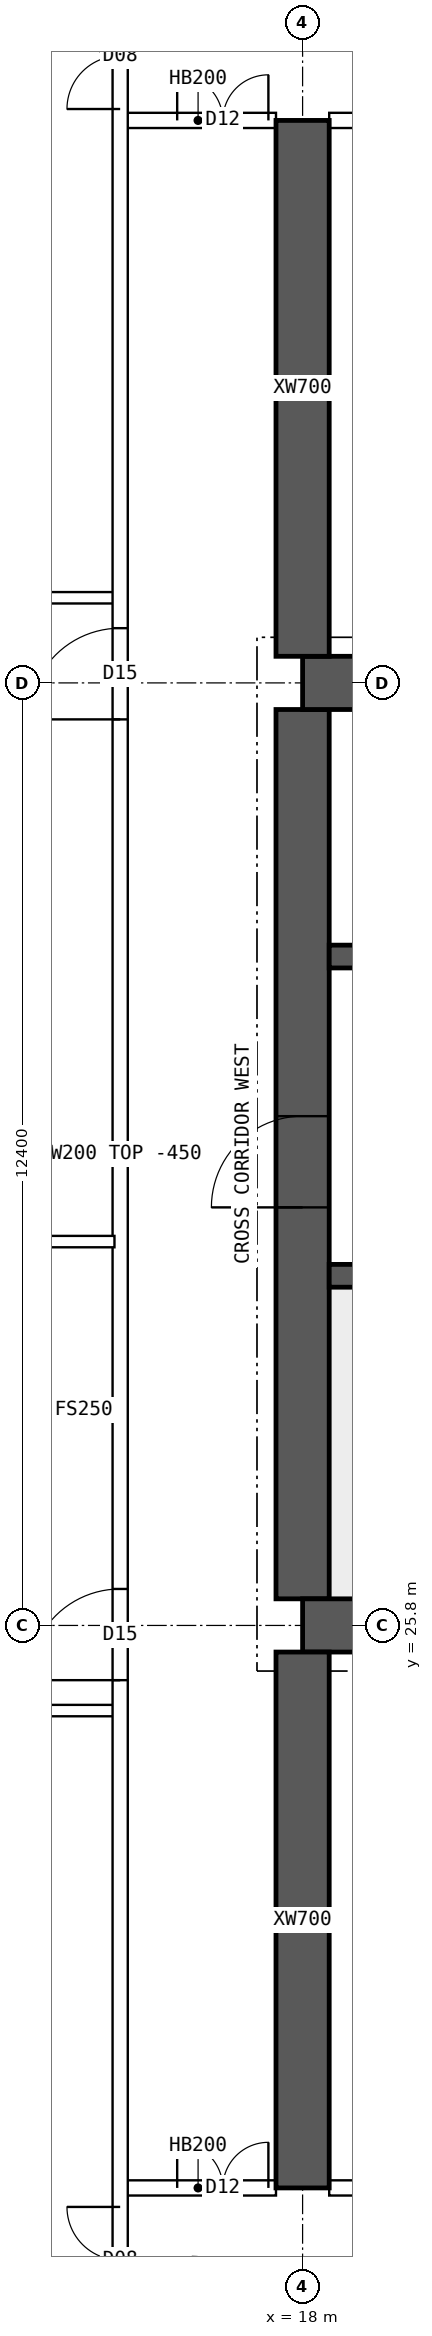
"""IFC4 building model, lengths in metres.
Left out: names, types, materials, properties, quantities, classifications, styles, units other than length and angle.
Written with IfcOpenShell. Run it as: python <this file> out.ifc"""

import sys

from ifc_helpers import new_model, si_unit, direction, frame, frame_2d, origin, place, context, subcontext, project, spatial, polyline, rectangle, outline, extrude, element, fill, save


model = new_model("IFC4")
c1 = context("Model", 3, precision=1e-05, world=origin(), true_north=direction((0.0, 1.0)))
c2 = subcontext(c1, "Body", "Model", "MODEL_VIEW")
j1 = project(units=[si_unit("LENGTHUNIT", "METRE"), si_unit("PLANEANGLEUNIT", "RADIAN")], contexts=[c1])
p1 = place(None, origin())
s1 = spatial("IfcSite", under=j1, at=p1, CompositionType="ELEMENT")
p2 = place(p1, origin())
s2 = spatial("IfcBuilding", under=s1, at=p2, CompositionType="ELEMENT")
p3 = place(p2, frame((0.0, 0.0, 227.8)))
s3 = spatial("IfcBuildingStorey", under=s2, at=p3, CompositionType="ELEMENT", Elevation=227.8)
for number, where, z_axis, x_axis in (
    (1, (18.0, 25.8, 0.0), (0.0, 0.0, 1.0), (1.0, 0.0, 0.0)),
    (2, (18.0, 38.2, 0.0), (0.0, 0.0, 1.0), (1.0, 0.0, 0.0)),
):
    element("IfcWall", number, at=place(p3, frame(where, z_axis=z_axis, x_axis=x_axis)), inside=s3, PredefinedType="SHEAR", context=c2, shape_type="SweptSolid", body=[
        extrude(rectangle(XDim=48.0, YDim=0.7, at=frame_2d((24.0, 0.0))), origin(), (0.0, 0.0, 1.0), 3.75),
    ])
p4 = place(p3, frame((18.0, 26.15, 0.0), z_axis=(0.0, 0.0, 1.0), x_axis=(0.0, 1.0, 0.0)))
e3 = element("IfcWall", 3, at=p4, inside=s3, PredefinedType="SHEAR", context=c2, shape_type="SweptSolid", body=[
    extrude(rectangle(XDim=11.7, YDim=0.7, at=frame_2d((5.85, 0.0))), origin(), (0.0, 0.0, 1.0), 3.75),
])
p5 = place(p4, frame((5.15, 0.0, 0.0)))
e4 = element("IfcOpeningElement", 4, at=p5, cuts=e3, PredefinedType="OPENING", context=c2, shape_type="SweptSolid", body=[
    extrude(rectangle(XDim=1.2, YDim=2.1, at=frame_2d((0.6, 1.05))), frame((0.0, 0.36, 0.0), z_axis=(0.0, -1.0, 0.0), x_axis=(1.0, 0.0, 0.0)), (0.0, 0.0, 1.0), 0.72),
])
p6 = place(p3, frame((18.35, 30.4, 0.0), z_axis=(0.0, 0.0, 1.0), x_axis=(1.0, 0.0, 0.0)))
e5 = element("IfcWall", 5, at=p6, inside=s3, PredefinedType="SHEAR", context=c2, shape_type="SweptSolid", body=[
    extrude(rectangle(XDim=47.3, YDim=0.3, at=frame_2d((23.65, 0.0))), origin(), (0.0, 0.0, 1.0), 3.75),
])
p7 = place(p6, frame((0.4, 0.0, 0.0)))
e6 = element("IfcOpeningElement", 6, at=p7, cuts=e5, PredefinedType="OPENING", context=c2, shape_type="SweptSolid", body=[
    extrude(rectangle(XDim=1.0, YDim=2.1, at=frame_2d((0.5, 1.05))), frame((0.0, 0.16, 0.0), z_axis=(0.0, -1.0, 0.0), x_axis=(1.0, 0.0, 0.0)), (0.0, 0.0, 1.0), 0.32),
])
p8 = place(p6, frame((45.9, 0.0, 0.0)))
e7 = element("IfcOpeningElement", 7, at=p8, cuts=e5, PredefinedType="OPENING", context=c2, shape_type="SweptSolid", body=[
    extrude(rectangle(XDim=1.0, YDim=2.1, at=frame_2d((0.5, 1.05))), frame((0.0, 0.16, 0.0), z_axis=(0.0, -1.0, 0.0), x_axis=(1.0, 0.0, 0.0)), (0.0, 0.0, 1.0), 0.32),
])
p9 = place(p6, frame((8.4, 0.0, 0.0)))
e8 = element("IfcOpeningElement", 8, at=p9, cuts=e5, PredefinedType="OPENING", context=c2, shape_type="SweptSolid", body=[
    extrude(rectangle(XDim=1.1, YDim=2.1, at=frame_2d((0.55, 1.05))), frame((0.0, 0.16, 0.0), z_axis=(0.0, -1.0, 0.0), x_axis=(1.0, 0.0, 0.0)), (0.0, 0.0, 1.0), 0.32),
])
p10 = place(p6, frame((11.0, 0.0, 0.0)))
e9 = element("IfcOpeningElement", 9, at=p10, cuts=e5, PredefinedType="OPENING", context=c2, shape_type="SweptSolid", body=[
    extrude(rectangle(XDim=1.1, YDim=2.1, at=frame_2d((0.55, 1.05))), frame((0.0, 0.16, 0.0), z_axis=(0.0, -1.0, 0.0), x_axis=(1.0, 0.0, 0.0)), (0.0, 0.0, 1.0), 0.32),
])
p11 = place(p6, frame((13.6, 0.0, 0.0)))
e10 = element("IfcOpeningElement", 10, at=p11, cuts=e5, PredefinedType="OPENING", context=c2, shape_type="SweptSolid", body=[
    extrude(rectangle(XDim=1.1, YDim=2.1, at=frame_2d((0.55, 1.05))), frame((0.0, 0.16, 0.0), z_axis=(0.0, -1.0, 0.0), x_axis=(1.0, 0.0, 0.0)), (0.0, 0.0, 1.0), 0.32),
])
p12 = place(p6, frame((16.2, 0.0, 0.0)))
e11 = element("IfcOpeningElement", 11, at=p12, cuts=e5, PredefinedType="OPENING", context=c2, shape_type="SweptSolid", body=[
    extrude(rectangle(XDim=1.1, YDim=2.1, at=frame_2d((0.55, 1.05))), frame((0.0, 0.16, 0.0), z_axis=(0.0, -1.0, 0.0), x_axis=(1.0, 0.0, 0.0)), (0.0, 0.0, 1.0), 0.32),
])
p13 = place(p6, frame((18.975, 0.0, 0.0)))
e12 = element("IfcOpeningElement", 12, at=p13, cuts=e5, PredefinedType="OPENING", context=c2, shape_type="SweptSolid", body=[
    extrude(rectangle(XDim=0.9, YDim=2.1, at=frame_2d((0.45, 1.05))), frame((0.0, 0.16, 0.0), z_axis=(0.0, -1.0, 0.0), x_axis=(1.0, 0.0, 0.0)), (0.0, 0.0, 1.0), 0.32),
])
p14 = place(p6, frame((24.475, 0.0, 0.0)))
e13 = element("IfcOpeningElement", 13, at=p14, cuts=e5, PredefinedType="OPENING", context=c2, shape_type="SweptSolid", body=[
    extrude(rectangle(XDim=0.9, YDim=2.1, at=frame_2d((0.45, 1.05))), frame((0.0, 0.16, 0.0), z_axis=(0.0, -1.0, 0.0), x_axis=(1.0, 0.0, 0.0)), (0.0, 0.0, 1.0), 0.32),
])
p15 = place(p6, frame((30.267, 0.0, 0.0)))
e14 = element("IfcOpeningElement", 14, at=p15, cuts=e5, PredefinedType="OPENING", context=c2, shape_type="SweptSolid", body=[
    extrude(rectangle(XDim=1.1, YDim=2.1, at=frame_2d((0.55, 1.05))), frame((0.0, 0.16, 0.0), z_axis=(0.0, -1.0, 0.0), x_axis=(1.0, 0.0, 0.0)), (0.0, 0.0, 1.0), 0.32),
])
p16 = place(p6, frame((33.8, 0.0, 0.0)))
e15 = element("IfcOpeningElement", 15, at=p16, cuts=e5, PredefinedType="OPENING", context=c2, shape_type="SweptSolid", body=[
    extrude(rectangle(XDim=1.1, YDim=2.1, at=frame_2d((0.55, 1.05))), frame((0.0, 0.16, 0.0), z_axis=(0.0, -1.0, 0.0), x_axis=(1.0, 0.0, 0.0)), (0.0, 0.0, 1.0), 0.32),
])
p17 = place(p6, frame((37.333, 0.0, 0.0)))
e16 = element("IfcOpeningElement", 16, at=p17, cuts=e5, PredefinedType="OPENING", context=c2, shape_type="SweptSolid", body=[
    extrude(rectangle(XDim=1.1, YDim=2.1, at=frame_2d((0.55, 1.05))), frame((0.0, 0.16, 0.0), z_axis=(0.0, -1.0, 0.0), x_axis=(1.0, 0.0, 0.0)), (0.0, 0.0, 1.0), 0.32),
])
p18 = place(p3, frame((18.35, 34.6, 0.0), z_axis=(0.0, 0.0, 1.0), x_axis=(1.0, 0.0, 0.0)))
e17 = element("IfcWall", 17, at=p18, inside=s3, PredefinedType="SHEAR", context=c2, shape_type="SweptSolid", body=[
    extrude(rectangle(XDim=47.3, YDim=0.3, at=frame_2d((23.65, 0.0))), origin(), (0.0, 0.0, 1.0), 3.75),
])
p19 = place(p18, frame((0.9, 0.0, 0.0)))
e18 = element("IfcOpeningElement", 18, at=p19, cuts=e17, PredefinedType="OPENING", context=c2, shape_type="SweptSolid", body=[
    extrude(rectangle(XDim=1.1, YDim=2.1, at=frame_2d((0.55, 1.05))), frame((0.0, 0.16, 0.0), z_axis=(0.0, -1.0, 0.0), x_axis=(1.0, 0.0, 0.0)), (0.0, 0.0, 1.0), 0.32),
])
p20 = place(p18, frame((45.3, 0.0, 0.0)))
e19 = element("IfcOpeningElement", 19, at=p20, cuts=e17, PredefinedType="OPENING", context=c2, shape_type="SweptSolid", body=[
    extrude(rectangle(XDim=1.1, YDim=2.1, at=frame_2d((0.55, 1.05))), frame((0.0, 0.16, 0.0), z_axis=(0.0, -1.0, 0.0), x_axis=(1.0, 0.0, 0.0)), (0.0, 0.0, 1.0), 0.32),
])
p21 = place(p18, frame((4.25, 0.0, 0.0)))
e20 = element("IfcOpeningElement", 20, at=p21, cuts=e17, PredefinedType="OPENING", context=c2, shape_type="SweptSolid", body=[
    extrude(rectangle(XDim=0.9, YDim=2.1, at=frame_2d((0.45, 1.05))), frame((0.0, 0.16, 0.0), z_axis=(0.0, -1.0, 0.0), x_axis=(1.0, 0.0, 0.0)), (0.0, 0.0, 1.0), 0.32),
])
p22 = place(p18, frame((42.15, 0.0, 0.0)))
e21 = element("IfcOpeningElement", 21, at=p22, cuts=e17, PredefinedType="OPENING", context=c2, shape_type="SweptSolid", body=[
    extrude(rectangle(XDim=0.9, YDim=2.1, at=frame_2d((0.45, 1.05))), frame((0.0, 0.16, 0.0), z_axis=(0.0, -1.0, 0.0), x_axis=(1.0, 0.0, 0.0)), (0.0, 0.0, 1.0), 0.32),
])
p23 = place(p18, frame((9.025, 0.0, 0.0)))
e22 = element("IfcOpeningElement", 22, at=p23, cuts=e17, PredefinedType="OPENING", context=c2, shape_type="SweptSolid", body=[
    extrude(rectangle(XDim=0.9, YDim=2.1, at=frame_2d((0.45, 1.05))), frame((0.0, 0.16, 0.0), z_axis=(0.0, -1.0, 0.0), x_axis=(1.0, 0.0, 0.0)), (0.0, 0.0, 1.0), 0.32),
])
p24 = place(p18, frame((12.999, 0.0, 0.0)))
e23 = element("IfcOpeningElement", 23, at=p24, cuts=e17, PredefinedType="OPENING", context=c2, shape_type="SweptSolid", body=[
    extrude(rectangle(XDim=0.9, YDim=2.1, at=frame_2d((0.45, 1.05))), frame((0.0, 0.16, 0.0), z_axis=(0.0, -1.0, 0.0), x_axis=(1.0, 0.0, 0.0)), (0.0, 0.0, 1.0), 0.32),
])
p25 = place(p18, frame((16.646, 0.0, 0.0)))
e24 = element("IfcOpeningElement", 24, at=p25, cuts=e17, PredefinedType="OPENING", context=c2, shape_type="SweptSolid", body=[
    extrude(rectangle(XDim=0.9, YDim=2.1, at=frame_2d((0.45, 1.05))), frame((0.0, 0.16, 0.0), z_axis=(0.0, -1.0, 0.0), x_axis=(1.0, 0.0, 0.0)), (0.0, 0.0, 1.0), 0.32),
])
p26 = place(p18, frame((20.405, 0.0, 0.0)))
e25 = element("IfcOpeningElement", 25, at=p26, cuts=e17, PredefinedType="OPENING", context=c2, shape_type="SweptSolid", body=[
    extrude(rectangle(XDim=0.9, YDim=2.1, at=frame_2d((0.45, 1.05))), frame((0.0, 0.16, 0.0), z_axis=(0.0, -1.0, 0.0), x_axis=(1.0, 0.0, 0.0)), (0.0, 0.0, 1.0), 0.32),
])
p27 = place(p18, frame((24.811, 0.0, 0.0)))
e26 = element("IfcOpeningElement", 26, at=p27, cuts=e17, PredefinedType="OPENING", context=c2, shape_type="SweptSolid", body=[
    extrude(rectangle(XDim=0.9, YDim=2.1, at=frame_2d((0.45, 1.05))), frame((0.0, 0.16, 0.0), z_axis=(0.0, -1.0, 0.0), x_axis=(1.0, 0.0, 0.0)), (0.0, 0.0, 1.0), 0.32),
])
p28 = place(p18, frame((27.608, 0.0, 0.0)))
e27 = element("IfcOpeningElement", 27, at=p28, cuts=e17, PredefinedType="OPENING", context=c2, shape_type="SweptSolid", body=[
    extrude(rectangle(XDim=0.9, YDim=2.1, at=frame_2d((0.45, 1.05))), frame((0.0, 0.16, 0.0), z_axis=(0.0, -1.0, 0.0), x_axis=(1.0, 0.0, 0.0)), (0.0, 0.0, 1.0), 0.32),
])
p29 = place(p18, frame((33.729, 0.0, 0.0)))
e28 = element("IfcOpeningElement", 28, at=p29, cuts=e17, PredefinedType="OPENING", context=c2, shape_type="SweptSolid", body=[
    extrude(rectangle(XDim=0.9, YDim=2.1, at=frame_2d((0.45, 1.05))), frame((0.0, 0.16, 0.0), z_axis=(0.0, -1.0, 0.0), x_axis=(1.0, 0.0, 0.0)), (0.0, 0.0, 1.0), 0.32),
])
for number, where, z_axis, x_axis in (
    (29, (18.0, 18.4, 0.0), (0.0, 0.0, 1.0), (0.0, 1.0, 0.0)),
    (30, (18.0, 38.55, 0.0), (0.0, 0.0, 1.0), (0.0, 1.0, 0.0)),
):
    element("IfcWall", number, at=place(p3, frame(where, z_axis=z_axis, x_axis=x_axis)), inside=s3, PredefinedType="SHEAR", context=c2, shape_type="SweptSolid", body=[
        extrude(rectangle(XDim=7.05, YDim=0.7, at=frame_2d((3.525, 0.0))), origin(), (0.0, 0.0, 1.0), 3.75),
    ])
p30 = place(p3, frame((15.6, 18.4, 0.0), z_axis=(0.0, 0.0, 1.0), x_axis=(1.0, 0.0, 0.0)))
e31 = element("IfcWall", 31, at=p30, inside=s3, PredefinedType="SOLIDWALL", context=c2, shape_type="SweptSolid", body=[
    extrude(rectangle(XDim=2.05, YDim=0.2, at=frame_2d((1.025, 0.0))), origin(), (0.0, 0.0, 1.0), 3.3),
])
p31 = place(p30, frame((0.75, 0.0, 0.0)))
e32 = element("IfcOpeningElement", 32, at=p31, cuts=e31, PredefinedType="OPENING", context=c2, shape_type="SweptSolid", body=[
    extrude(rectangle(XDim=1.2, YDim=2.1, at=frame_2d((0.6, 1.05))), frame((0.0, 0.11, 0.0), z_axis=(0.0, -1.0, 0.0), x_axis=(1.0, 0.0, 0.0)), (0.0, 0.0, 1.0), 0.22),
])
p32 = place(p3, frame((18.35, 18.4, 0.0), z_axis=(0.0, 0.0, 1.0), x_axis=(1.0, 0.0, 0.0)))
e33 = element("IfcWall", 33, at=p32, inside=s3, PredefinedType="SOLIDWALL", context=c2, shape_type="SweptSolid", body=[
    extrude(rectangle(XDim=5.3, YDim=0.2, at=frame_2d((2.65, 0.0))), origin(), (0.0, 0.0, 1.0), 3.3),
])
p33 = place(p32, frame((0.35, 0.0, 0.0)))
e34 = element("IfcOpeningElement", 34, at=p33, cuts=e33, PredefinedType="OPENING", context=c2, shape_type="SweptSolid", body=[
    extrude(rectangle(XDim=0.9, YDim=2.1, at=frame_2d((0.45, 1.05))), frame((0.0, 0.11, 0.0), z_axis=(0.0, -1.0, 0.0), x_axis=(1.0, 0.0, 0.0)), (0.0, 0.0, 1.0), 0.22),
])
p34 = place(p32, frame((3.2, 0.0, 0.0)))
e35 = element("IfcOpeningElement", 35, at=p34, cuts=e33, PredefinedType="OPENING", context=c2, shape_type="SweptSolid", body=[
    extrude(rectangle(XDim=0.9, YDim=2.1, at=frame_2d((0.45, 1.05))), frame((0.0, 0.11, 0.0), z_axis=(0.0, -1.0, 0.0), x_axis=(1.0, 0.0, 0.0)), (0.0, 0.0, 1.0), 0.22),
])
p35 = place(p3, frame((15.6, 45.6, 0.0), z_axis=(0.0, 0.0, 1.0), x_axis=(1.0, 0.0, 0.0)))
e36 = element("IfcWall", 36, at=p35, inside=s3, PredefinedType="SOLIDWALL", context=c2, shape_type="SweptSolid", body=[
    extrude(rectangle(XDim=2.05, YDim=0.2, at=frame_2d((1.025, 0.0))), origin(), (0.0, 0.0, 1.0), 3.3),
])
p36 = place(p35, frame((0.75, 0.0, 0.0)))
e37 = element("IfcOpeningElement", 37, at=p36, cuts=e36, PredefinedType="OPENING", context=c2, shape_type="SweptSolid", body=[
    extrude(rectangle(XDim=1.2, YDim=2.1, at=frame_2d((0.6, 1.05))), frame((0.0, 0.11, 0.0), z_axis=(0.0, -1.0, 0.0), x_axis=(1.0, 0.0, 0.0)), (0.0, 0.0, 1.0), 0.22),
])
p37 = place(p3, frame((18.35, 45.6, 0.0), z_axis=(0.0, 0.0, 1.0), x_axis=(1.0, 0.0, 0.0)))
e38 = element("IfcWall", 38, at=p37, inside=s3, PredefinedType="SOLIDWALL", context=c2, shape_type="SweptSolid", body=[
    extrude(rectangle(XDim=5.3, YDim=0.2, at=frame_2d((2.65, 0.0))), origin(), (0.0, 0.0, 1.0), 3.3),
])
p38 = place(p37, frame((0.8, 0.0, 0.0)))
e39 = element("IfcOpeningElement", 39, at=p38, cuts=e38, PredefinedType="OPENING", context=c2, shape_type="SweptSolid", body=[
    extrude(rectangle(XDim=1.0, YDim=2.1, at=frame_2d((0.5, 1.05))), frame((0.0, 0.11, 0.0), z_axis=(0.0, -1.0, 0.0), x_axis=(1.0, 0.0, 0.0)), (0.0, 0.0, 1.0), 0.22),
])
p39 = place(p3, frame((8.705, 30.85, 0.0), z_axis=(0.0, 0.0, 1.0), x_axis=(1.0, 0.0, 0.0)))
e40 = element("IfcWall", 40, at=p39, inside=s3, PredefinedType="PARTITIONING", context=c2, shape_type="SweptSolid", body=[
    extrude(outline(polyline([(0.0, 0.0), (6.82, 0.0), (6.82, 3.3), (3.597, 3.3), (3.595, 2.85), (2.997, 2.85), (2.995, 3.3), (0.0, 3.3), (0.0, 0.0)])), frame((0.0, 0.075, 0.0), z_axis=(0.0, -1.0, 0.0), x_axis=(1.0, 0.0, 0.0)), (0.0, 0.0, 1.0), 0.15),
])
p40 = place(p3, frame((15.6, 11.646, 0.0), z_axis=(0.0, 0.0, 1.0), x_axis=(0.0, 1.0, 0.0)))
e41 = element("IfcWall", 41, at=p40, inside=s3, PredefinedType="SOLIDWALL", context=c2, shape_type="SweptSolid", body=[
    extrude(rectangle(XDim=40.708, YDim=0.2, at=frame_2d((20.354, 0.0))), origin(), (0.0, 0.0, 1.0), 3.3),
])
p41 = place(p40, frame((13.434, 0.0, 0.0)))
e42 = element("IfcOpeningElement", 42, at=p41, cuts=e41, PredefinedType="OPENING", context=c2, shape_type="SweptSolid", body=[
    extrude(rectangle(XDim=1.2, YDim=2.1, at=frame_2d((0.6, 1.05))), frame((0.0, 0.11, 0.0), z_axis=(0.0, -1.0, 0.0), x_axis=(1.0, 0.0, 0.0)), (0.0, 0.0, 1.0), 0.22),
])
p42 = place(p40, frame((26.074, 0.0, 0.0)))
e43 = element("IfcOpeningElement", 43, at=p42, cuts=e41, PredefinedType="OPENING", context=c2, shape_type="SweptSolid", body=[
    extrude(rectangle(XDim=1.2, YDim=2.1, at=frame_2d((0.6, 1.05))), frame((0.0, 0.11, 0.0), z_axis=(0.0, -1.0, 0.0), x_axis=(1.0, 0.0, 0.0)), (0.0, 0.0, 1.0), 0.22),
])
p43 = place(p40, frame((5.104, 0.0, 0.0)))
e44 = element("IfcOpeningElement", 44, at=p43, cuts=e41, PredefinedType="OPENING", context=c2, shape_type="SweptSolid", body=[
    extrude(rectangle(XDim=1.4, YDim=2.1, at=frame_2d((0.7, 1.05))), frame((0.0, 0.11, 0.0), z_axis=(0.0, -1.0, 0.0), x_axis=(1.0, 0.0, 0.0)), (0.0, 0.0, 1.0), 0.22),
])
p44 = place(p40, frame((34.104, 0.0, 0.0)))
e45 = element("IfcOpeningElement", 45, at=p44, cuts=e41, PredefinedType="OPENING", context=c2, shape_type="SweptSolid", body=[
    extrude(rectangle(XDim=1.4, YDim=2.1, at=frame_2d((0.7, 1.05))), frame((0.0, 0.11, 0.0), z_axis=(0.0, -1.0, 0.0), x_axis=(1.0, 0.0, 0.0)), (0.0, 0.0, 1.0), 0.22),
])
for number, where, z_axis, x_axis in (
    (46, (8.705, 24.68, 0.0), (0.0, 0.0, 1.0), (1.0, 0.0, 0.0)),
    (47, (8.705, 39.32, 0.0), (0.0, 0.0, 1.0), (1.0, 0.0, 0.0)),
):
    element("IfcWall", number, at=place(p3, frame(where, z_axis=z_axis, x_axis=x_axis)), inside=s3, PredefinedType="PARTITIONING", context=c2, shape_type="SweptSolid", body=[
        extrude(rectangle(XDim=6.82, YDim=0.15, at=frame_2d((3.41, 0.0))), origin(), (0.0, 0.0, 1.0), 3.3),
    ])
p45 = place(p5, origin())
e48 = element("IfcDoor", 48, at=p45, inside=s3, OperationType="SINGLE_SWING_LEFT", PredefinedType="DOOR", context=c2, shape_type="SweptSolid", body=[
    extrude(rectangle(XDim=1.2, YDim=2.1, at=frame_2d((0.6, 1.05))), frame((0.0, 0.025, 0.0), z_axis=(0.0, -1.0, 0.0), x_axis=(1.0, 0.0, 0.0)), (0.0, 0.0, 1.0), 0.05),
])
fill(e4, e48)
p46 = place(p31, origin())
e49 = element("IfcDoor", 49, at=p46, inside=s3, OperationType="DOUBLE_DOOR_SINGLE_SWING", PredefinedType="DOOR", context=c2, shape_type="SweptSolid", body=[
    extrude(rectangle(XDim=1.2, YDim=2.1, at=frame_2d((0.6, 1.05))), frame((0.0, 0.025, 0.0), z_axis=(0.0, -1.0, 0.0), x_axis=(1.0, 0.0, 0.0)), (0.0, 0.0, 1.0), 0.05),
])
fill(e32, e49)
p47 = place(p36, origin())
e50 = element("IfcDoor", 50, at=p47, inside=s3, OperationType="DOUBLE_DOOR_SINGLE_SWING", PredefinedType="DOOR", context=c2, shape_type="SweptSolid", body=[
    extrude(rectangle(XDim=1.2, YDim=2.1, at=frame_2d((0.6, 1.05))), frame((0.0, 0.025, 0.0), z_axis=(0.0, -1.0, 0.0), x_axis=(1.0, 0.0, 0.0)), (0.0, 0.0, 1.0), 0.05),
])
fill(e37, e50)
p48 = place(p41, origin())
e51 = element("IfcDoor", 51, at=p48, inside=s3, OperationType="SINGLE_SWING_LEFT", PredefinedType="DOOR", context=c2, shape_type="SweptSolid", body=[
    extrude(rectangle(XDim=1.2, YDim=2.1, at=frame_2d((0.6, 1.05))), frame((0.0, 0.025, 0.0), z_axis=(0.0, -1.0, 0.0), x_axis=(1.0, 0.0, 0.0)), (0.0, 0.0, 1.0), 0.05),
])
fill(e42, e51)
p49 = place(p42, origin())
e52 = element("IfcDoor", 52, at=p49, inside=s3, OperationType="SINGLE_SWING_LEFT", PredefinedType="DOOR", context=c2, shape_type="SweptSolid", body=[
    extrude(rectangle(XDim=1.2, YDim=2.1, at=frame_2d((0.6, 1.05))), frame((0.0, 0.025, 0.0), z_axis=(0.0, -1.0, 0.0), x_axis=(1.0, 0.0, 0.0)), (0.0, 0.0, 1.0), 0.05),
])
fill(e43, e52)
p50 = place(p43, origin())
e53 = element("IfcDoor", 53, at=p50, inside=s3, OperationType="DOUBLE_DOOR_SINGLE_SWING", PredefinedType="DOOR", context=c2, shape_type="SweptSolid", body=[
    extrude(rectangle(XDim=1.4, YDim=2.1, at=frame_2d((0.7, 1.05))), frame((0.0, 0.025, 0.0), z_axis=(0.0, -1.0, 0.0), x_axis=(1.0, 0.0, 0.0)), (0.0, 0.0, 1.0), 0.05),
])
fill(e44, e53)
p51 = place(p44, origin())
e54 = element("IfcDoor", 54, at=p51, inside=s3, OperationType="DOUBLE_DOOR_SINGLE_SWING", PredefinedType="DOOR", context=c2, shape_type="SweptSolid", body=[
    extrude(rectangle(XDim=1.4, YDim=2.1, at=frame_2d((0.7, 1.05))), frame((0.0, 0.025, 0.0), z_axis=(0.0, -1.0, 0.0), x_axis=(1.0, 0.0, 0.0)), (0.0, 0.0, 1.0), 0.05),
])
fill(e45, e54)
save(model, sys.argv[1])
